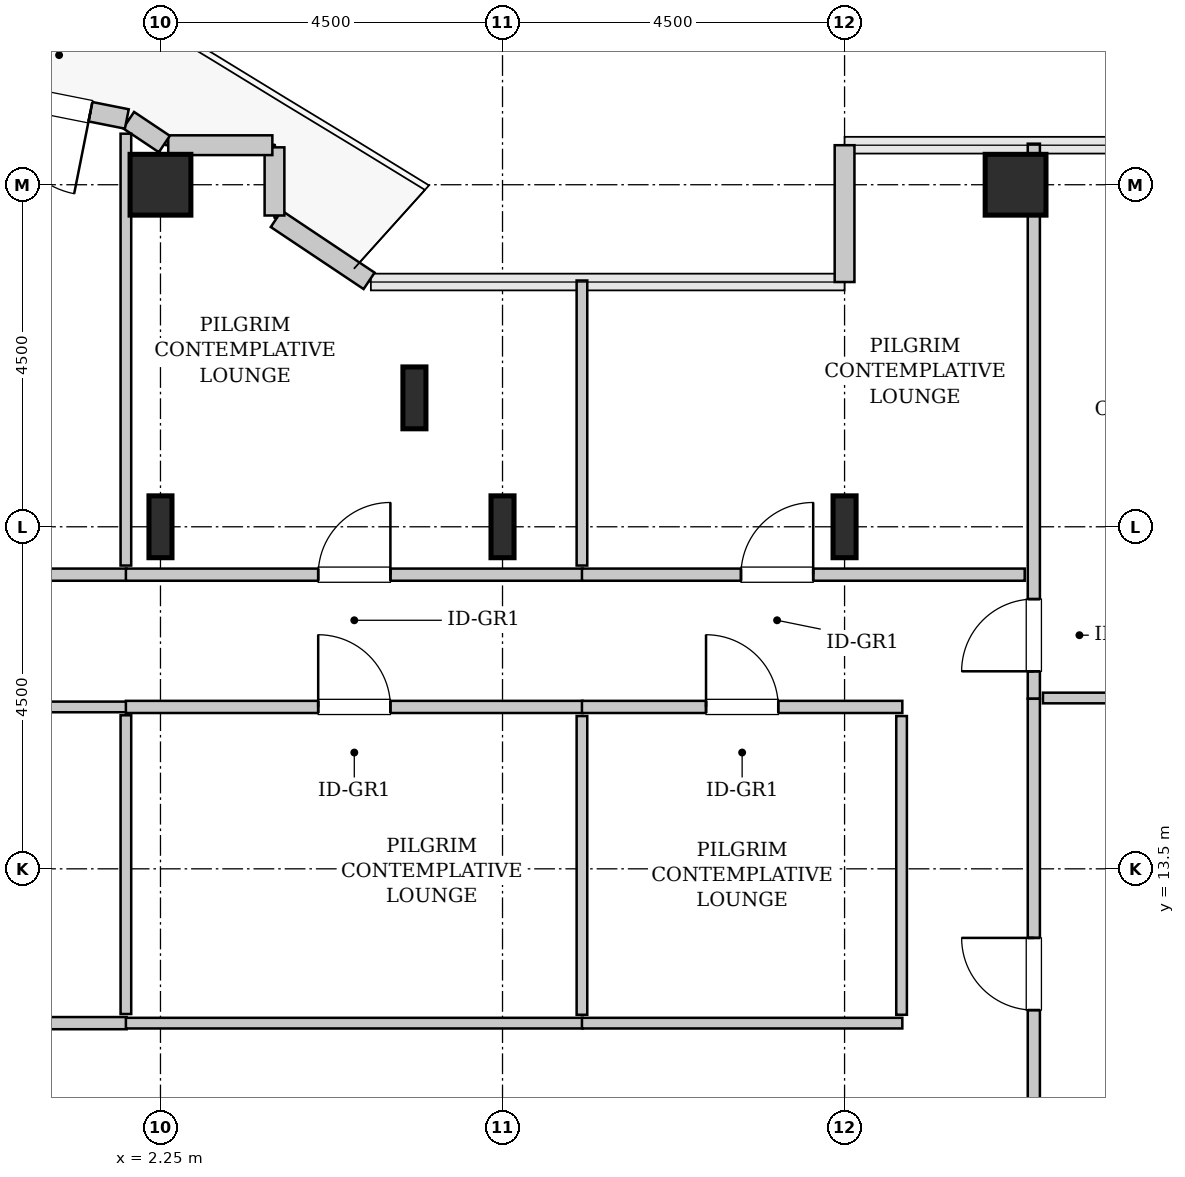
"""IFC4 building model, lengths in metres.
Left out: names, types, materials, properties, quantities, classifications, styles, units other than length and angle.
Written with IfcOpenShell. Run it as: python <this file> out.ifc"""

import sys

from ifc_helpers import new_model, si_unit, direction, frame, frame_2d, origin, origin_2d, place, context, subcontext, project, spatial, rectangle, hollow_rectangle, i_section, extrude, source, transform, mapped, element, fill, save


model = new_model("IFC4")
c1 = context("Model", 3, precision=1e-05, world=origin(), true_north=direction((0.0, 1.0)))
c2 = subcontext(c1, "Body", "Model", "MODEL_VIEW")
j1 = project(units=[si_unit("LENGTHUNIT", "METRE"), si_unit("PLANEANGLEUNIT", "RADIAN")], contexts=[c1])
p1 = place(None, origin())
s1 = spatial("IfcSite", under=j1, at=p1, CompositionType="ELEMENT")
p2 = place(p1, origin())
s2 = spatial("IfcBuilding", under=s1, at=p2, CompositionType="ELEMENT")
p3 = place(p2, frame((0.0, 0.0, 179.2)))
s3 = spatial("IfcBuildingStorey", under=s2, at=p3, CompositionType="ELEMENT", Elevation=179.2)
m1 = source(origin(), c2, "Body", "SweptSolid", [
    extrude(i_section(OverallWidth=0.303, OverallDepth=0.814, WebThickness=0.021, FlangeThickness=0.04, FilletRadius=0.03, at=origin_2d()), origin(), (0.0, 0.0, 1.0), 3.8),
])
p4 = place(p3, frame((2.25, 18.0, 0.0), z_axis=(0.0, 0.0, 1.0), x_axis=(1.0, 0.0, 0.0)))
e1 = element("IfcColumn", 1, at=p4, inside=s3, PredefinedType="COLUMN", context=c2, shape_type="MappedRepresentation", body=[
    mapped(m1, transform((0.0, 0.0, 0.0), x_axis=(1.0, 0.0, 0.0), y_axis=(0.0, 1.0, 0.0), z_axis=(0.0, 0.0, 1.0), scale=1.0)),
])
m2 = source(origin(), c2, "Body", "SweptSolid", [
    extrude(hollow_rectangle(XDim=0.8, YDim=0.8, WallThickness=0.04, InnerFilletRadius=0.04, OuterFilletRadius=0.08, at=origin_2d()), origin(), (0.0, 0.0, 1.0), 3.8),
])
p5 = place(p3, frame((2.25, 22.5, 0.0), z_axis=(0.0, 0.0, 1.0), x_axis=(1.0, 0.0, 0.0)))
e2 = element("IfcColumn", 2, at=p5, inside=s3, PredefinedType="COLUMN", context=c2, shape_type="MappedRepresentation", body=[
    mapped(m2, transform((0.0, 0.0, 0.0), x_axis=(1.0, 0.0, 0.0), y_axis=(0.0, 1.0, 0.0), z_axis=(0.0, 0.0, 1.0), scale=1.0)),
])
for number, where, z_axis, x_axis in (
    (3, (5.591, 19.696, 0.0), (0.0, 0.0, 1.0), (1.0, 0.0, 0.0)),
    (4, (6.75, 18.0, 0.0), (0.0, 0.0, 1.0), (1.0, 0.0, 0.0)),
    (5, (11.25, 18.0, 0.0), (0.0, 0.0, 1.0), (1.0, 0.0, 0.0)),
):
    element("IfcColumn", number, at=place(p3, frame(where, z_axis=z_axis, x_axis=x_axis)), inside=s3, PredefinedType="COLUMN", context=c2, shape_type="MappedRepresentation", body=[
        mapped(m1, transform((0.0, 0.0, 0.0), x_axis=(1.0, 0.0, 0.0), y_axis=(0.0, 1.0, 0.0), z_axis=(0.0, 0.0, 1.0), scale=1.0)),
    ])
p6 = place(p3, frame((13.5, 22.5, 0.0), z_axis=(0.0, 0.0, 1.0), x_axis=(1.0, 0.0, 0.0)))
e6 = element("IfcColumn", 6, at=p6, inside=s3, PredefinedType="COLUMN", context=c2, shape_type="MappedRepresentation", body=[
    mapped(m2, transform((0.0, 0.0, 0.0), x_axis=(1.0, 0.0, 0.0), y_axis=(0.0, 1.0, 0.0), z_axis=(0.0, 0.0, 1.0), scale=1.0)),
])
m3 = source(origin(), c2, "Body", "SweptSolid", [
    extrude(rectangle(XDim=1.8, YDim=0.26, at=frame_2d((0.9, 0.0))), origin(), (0.0, 0.0, 1.0), 3.55),
])
p7 = place(p3, frame((11.25, 23.02, 0.0), z_axis=(0.0, 0.0, 1.0), x_axis=(0.0, -1.0, 0.0)))
e7 = element("IfcWall", 7, at=p7, inside=s3, PredefinedType="SOLIDWALL", context=c2, shape_type="MappedRepresentation", body=[
    mapped(m3, transform((0.0, 0.0, 0.0), x_axis=(1.0, 0.0, 0.0), y_axis=(0.0, 1.0, 0.0), z_axis=(0.0, 0.0, 1.0), scale=1.0)),
])
m4 = source(origin(), c2, "Body", "SweptSolid", [
    extrude(rectangle(XDim=1.469, YDim=0.26, at=frame_2d((0.734, 0.0))), origin(), (0.0, 0.0, 1.0), 3.55),
])
p8 = place(p3, frame((4.995, 21.236, 0.0), z_axis=(0.0, 0.0, 1.0), x_axis=(-0.831461760506, 0.555581983884, 0.0)))
e8 = element("IfcWall", 8, at=p8, inside=s3, PredefinedType="SOLIDWALL", context=c2, shape_type="MappedRepresentation", body=[
    mapped(m4, transform((0.0, 0.0, 0.0), x_axis=(1.0, 0.0, 0.0), y_axis=(0.0, 1.0, 0.0), z_axis=(0.0, 0.0, 1.0), scale=1.0)),
])
m5 = source(origin(), c2, "Body", "SweptSolid", [
    extrude(rectangle(XDim=0.897, YDim=0.26, at=frame_2d((0.448, 0.0))), origin(), (0.0, 0.0, 1.0), 3.55),
])
p9 = place(p3, frame((3.75, 22.095, 0.0), z_axis=(0.0, 0.0, 1.0), x_axis=(0.0, 1.0, 0.0)))
e9 = element("IfcWall", 9, at=p9, inside=s3, PredefinedType="SOLIDWALL", context=c2, shape_type="MappedRepresentation", body=[
    mapped(m5, transform((0.0, 0.0, 0.0), x_axis=(1.0, 0.0, 0.0), y_axis=(0.0, 1.0, 0.0), z_axis=(0.0, 0.0, 1.0), scale=1.0)),
])
m6 = source(origin(), c2, "Body", "SweptSolid", [
    extrude(rectangle(XDim=1.37, YDim=0.26, at=frame_2d((0.685, 0.0))), origin(), (0.0, 0.0, 1.0), 3.55),
])
p10 = place(p3, frame((3.722, 23.02, 0.0), z_axis=(0.0, 0.0, 1.0), x_axis=(-1.0, 0.0, 0.0)))
e10 = element("IfcWall", 10, at=p10, inside=s3, PredefinedType="SOLIDWALL", context=c2, shape_type="MappedRepresentation", body=[
    mapped(m6, transform((0.0, 0.0, 0.0), x_axis=(1.0, 0.0, 0.0), y_axis=(0.0, 1.0, 0.0), z_axis=(0.0, 0.0, 1.0), scale=1.0)),
])
m7 = source(origin(), c2, "Body", "SweptSolid", [
    extrude(rectangle(XDim=0.565, YDim=0.26, at=frame_2d((0.283, 0.0))), origin(), (0.0, 0.0, 1.0), 3.55),
])
p11 = place(p3, frame((2.301, 23.036, 0.0), z_axis=(0.0, 0.0, 1.0), x_axis=(-0.831651492666, 0.555297933317, 0.0)))
e11 = element("IfcWall", 11, at=p11, inside=s3, PredefinedType="SOLIDWALL", context=c2, shape_type="MappedRepresentation", body=[
    mapped(m7, transform((0.0, 0.0, 0.0), x_axis=(1.0, 0.0, 0.0), y_axis=(0.0, 1.0, 0.0), z_axis=(0.0, 0.0, 1.0), scale=1.0)),
])
m8 = source(origin(), c2, "Body", "SweptSolid", [
    extrude(rectangle(XDim=4.137, YDim=0.26, at=frame_2d((2.068, 0.0))), origin(), (0.0, 0.0, 1.0), 3.55),
])
p12 = place(p3, frame((1.807, 23.365, 0.0), z_axis=(0.0, 0.0, 1.0), x_axis=(-0.980782170794, 0.195105954428, 0.0)))
e12 = element("IfcWall", 12, at=p12, inside=s3, PredefinedType="SOLIDWALL", context=c2, shape_type="MappedRepresentation", body=[
    mapped(m8, transform((0.0, 0.0, 0.0), x_axis=(1.0, 0.0, 0.0), y_axis=(0.0, 1.0, 0.0), z_axis=(0.0, 0.0, 1.0), scale=1.0)),
])
p13 = place(p12, frame((0.488, 0.0, 0.0)))
e13 = element("IfcOpeningElement", 13, at=p13, cuts=e12, PredefinedType="OPENING", context=c2, shape_type="SweptSolid", body=[
    extrude(rectangle(XDim=1.1, YDim=2.2, at=frame_2d((0.55, 1.1))), frame((0.0, 0.14, 0.0), z_axis=(0.0, -1.0, 0.0), x_axis=(1.0, 0.0, 0.0)), (0.0, 0.0, 1.0), 0.28),
])
m9 = source(origin(), c2, "Body", "SweptSolid", [
    extrude(rectangle(XDim=7.302, YDim=0.16, at=frame_2d((3.651, 0.0))), origin(), (0.0, 0.0, 1.0), 3.535),
])
p14 = place(p3, frame((13.74, 15.738, 0.0), z_axis=(0.0, 0.0, 1.0), x_axis=(0.0, 1.0, 0.0)))
e14 = element("IfcWall", 14, at=p14, inside=s3, PredefinedType="PARTITIONING", context=c2, shape_type="MappedRepresentation", body=[
    mapped(m9, transform((0.0, 0.0, 0.0), x_axis=(1.0, 0.0, 0.0), y_axis=(0.0, 1.0, 0.0), z_axis=(0.0, 0.0, 1.0), scale=1.0)),
])
p15 = place(p14, frame((0.361, 0.0, 0.0)))
e15 = element("IfcOpeningElement", 15, at=p15, cuts=e14, PredefinedType="OPENING", context=c2, shape_type="SweptSolid", body=[
    extrude(rectangle(XDim=0.95, YDim=2.1, at=frame_2d((0.475, 1.05))), frame((0.0, 0.09, 0.0), z_axis=(0.0, -1.0, 0.0), x_axis=(1.0, 0.0, 0.0)), (0.0, 0.0, 1.0), 0.18),
])
m10 = source(origin(), c2, "Body", "SweptSolid", [
    extrude(rectangle(XDim=11.43, YDim=0.14, at=frame_2d((5.715, 0.0))), origin(), (0.0, 0.0, 1.0), 3.535),
])
p16 = place(p3, frame((13.86, 15.748, 0.0), z_axis=(0.0, 0.0, 1.0), x_axis=(1.0, 0.0, 0.0)))
e16 = element("IfcWall", 16, at=p16, inside=s3, PredefinedType="PARTITIONING", context=c2, shape_type="MappedRepresentation", body=[
    mapped(m10, transform((0.0, 0.0, 0.0), x_axis=(1.0, 0.0, 0.0), y_axis=(0.0, 1.0, 0.0), z_axis=(0.0, 0.0, 1.0), scale=1.0)),
])
m11 = source(origin(), c2, "Body", "SweptSolid", [
    extrude(rectangle(XDim=7.242, YDim=0.16, at=frame_2d((3.621, 0.0))), origin(), (0.0, 0.0, 1.0), 3.535),
])
p17 = place(p3, frame((13.74, 8.495, 0.0), z_axis=(0.0, 0.0, 1.0), x_axis=(0.0, 1.0, 0.0)))
e17 = element("IfcWall", 17, at=p17, inside=s3, PredefinedType="PARTITIONING", context=c2, shape_type="MappedRepresentation", body=[
    mapped(m11, transform((0.0, 0.0, 0.0), x_axis=(1.0, 0.0, 0.0), y_axis=(0.0, 1.0, 0.0), z_axis=(0.0, 0.0, 1.0), scale=1.0)),
])
p18 = place(p17, frame((3.146, 0.0, 0.0)))
e18 = element("IfcOpeningElement", 18, at=p18, cuts=e17, PredefinedType="OPENING", context=c2, shape_type="SweptSolid", body=[
    extrude(rectangle(XDim=0.95, YDim=2.1, at=frame_2d((0.475, 1.05))), frame((0.0, 0.09, 0.0), z_axis=(0.0, -1.0, 0.0), x_axis=(1.0, 0.0, 0.0)), (0.0, 0.0, 1.0), 0.18),
])
m12 = source(origin(), c2, "Body", "SweptSolid", [
    extrude(rectangle(XDim=13.815, YDim=0.16, at=frame_2d((6.907, 0.0))), origin(), (0.0, 0.0, 1.0), 3.535),
])
p19 = place(p3, frame((-12.01, 11.47, 0.0), z_axis=(0.0, 0.0, 1.0), x_axis=(1.0, 0.0, 0.0)))
e19 = element("IfcWall", 19, at=p19, inside=s3, PredefinedType="PARTITIONING", context=c2, shape_type="MappedRepresentation", body=[
    mapped(m12, transform((0.0, 0.0, 0.0), x_axis=(1.0, 0.0, 0.0), y_axis=(0.0, 1.0, 0.0), z_axis=(0.0, 0.0, 1.0), scale=1.0)),
])
p20 = place(p19, frame((6.433, 0.0, 0.0)))
e20 = element("IfcOpeningElement", 20, at=p20, cuts=e19, PredefinedType="OPENING", context=c2, shape_type="SweptSolid", body=[
    extrude(rectangle(XDim=0.95, YDim=2.1, at=frame_2d((0.475, 1.05))), frame((0.0, 0.09, 0.0), z_axis=(0.0, -1.0, 0.0), x_axis=(1.0, 0.0, 0.0)), (0.0, 0.0, 1.0), 0.18),
])
m13 = source(origin(), c2, "Body", "SweptSolid", [
    extrude(rectangle(XDim=13.815, YDim=0.14, at=frame_2d((6.907, 0.0))), origin(), (0.0, 0.0, 1.0), 3.535),
])
p21 = place(p3, frame((-12.01, 15.63, 0.0), z_axis=(0.0, 0.0, 1.0), x_axis=(1.0, 0.0, 0.0)))
e21 = element("IfcWall", 21, at=p21, inside=s3, PredefinedType="PARTITIONING", context=c2, shape_type="MappedRepresentation", body=[
    mapped(m13, transform((0.0, 0.0, 0.0), x_axis=(1.0, 0.0, 0.0), y_axis=(0.0, 1.0, 0.0), z_axis=(0.0, 0.0, 1.0), scale=1.0)),
])
m14 = source(origin(), c2, "Body", "SweptSolid", [
    extrude(rectangle(XDim=3.93, YDim=0.14, at=frame_2d((1.965, 0.0))), origin(), (0.0, 0.0, 1.0), 3.535),
])
p22 = place(p3, frame((1.795, 11.59, 0.0), z_axis=(0.0, 0.0, 1.0), x_axis=(0.0, 1.0, 0.0)))
e22 = element("IfcWall", 22, at=p22, inside=s3, PredefinedType="PARTITIONING", context=c2, shape_type="MappedRepresentation", body=[
    mapped(m14, transform((0.0, 0.0, 0.0), x_axis=(1.0, 0.0, 0.0), y_axis=(0.0, 1.0, 0.0), z_axis=(0.0, 0.0, 1.0), scale=1.0)),
])
m15 = source(origin(), c2, "Body", "SweptSolid", [
    extrude(rectangle(XDim=9.245, YDim=0.16, at=frame_2d((4.623, 0.0))), origin(), (0.0, 0.0, 1.0), 3.535),
])
p23 = place(p3, frame((-7.44, 17.37, 0.0), z_axis=(0.0, 0.0, 1.0), x_axis=(1.0, 0.0, 0.0)))
e23 = element("IfcWall", 23, at=p23, inside=s3, PredefinedType="PARTITIONING", context=c2, shape_type="MappedRepresentation", body=[
    mapped(m15, transform((0.0, 0.0, 0.0), x_axis=(1.0, 0.0, 0.0), y_axis=(0.0, 1.0, 0.0), z_axis=(0.0, 0.0, 1.0), scale=1.0)),
])
p24 = place(p23, frame((3.529, 0.0, 0.0)))
e24 = element("IfcOpeningElement", 24, at=p24, cuts=e23, PredefinedType="OPENING", context=c2, shape_type="SweptSolid", body=[
    extrude(rectangle(XDim=0.95, YDim=2.1, at=frame_2d((0.475, 1.05))), frame((0.0, 0.09, 0.0), z_axis=(0.0, -1.0, 0.0), x_axis=(1.0, 0.0, 0.0)), (0.0, 0.0, 1.0), 0.18),
])
m16 = source(origin(), c2, "Body", "SweptSolid", [
    extrude(rectangle(XDim=5.681, YDim=0.14, at=frame_2d((2.841, 0.0))), origin(), (0.0, 0.0, 1.0), 2.875),
])
p25 = place(p3, frame((1.795, 17.49, 0.0), z_axis=(0.0, 0.0, 1.0), x_axis=(0.0, 1.0, 0.0)))
e25 = element("IfcWall", 25, at=p25, inside=s3, PredefinedType="PARTITIONING", context=c2, shape_type="MappedRepresentation", body=[
    mapped(m16, transform((0.0, 0.0, 0.0), x_axis=(1.0, 0.0, 0.0), y_axis=(0.0, 1.0, 0.0), z_axis=(0.0, 0.0, 1.0), scale=1.0)),
])
m17 = source(origin(), c2, "Body", "SweptSolid", [
    extrude(rectangle(XDim=6.01, YDim=0.16, at=frame_2d((3.005, 0.0))), origin(), (0.0, 0.0, 1.0), 3.535),
])
p26 = place(p3, frame((1.795, 17.37, 0.0), z_axis=(0.0, 0.0, 1.0), x_axis=(1.0, 0.0, 0.0)))
e26 = element("IfcWall", 26, at=p26, inside=s3, PredefinedType="PARTITIONING", context=c2, shape_type="MappedRepresentation", body=[
    mapped(m17, transform((0.0, 0.0, 0.0), x_axis=(1.0, 0.0, 0.0), y_axis=(0.0, 1.0, 0.0), z_axis=(0.0, 0.0, 1.0), scale=1.0)),
])
p27 = place(p26, frame((2.53, 0.0, 0.0)))
e27 = element("IfcOpeningElement", 27, at=p27, cuts=e26, PredefinedType="OPENING", context=c2, shape_type="SweptSolid", body=[
    extrude(rectangle(XDim=0.95, YDim=2.1, at=frame_2d((0.475, 1.05))), frame((0.0, 0.09, 0.0), z_axis=(0.0, -1.0, 0.0), x_axis=(1.0, 0.0, 0.0)), (0.0, 0.0, 1.0), 0.18),
])
m18 = source(origin(), c2, "Body", "SweptSolid", [
    extrude(rectangle(XDim=3.75, YDim=0.14, at=frame_2d((1.875, 0.0))), origin(), (0.0, 0.0, 1.0), 3.535),
])
p28 = place(p3, frame((7.795, 17.49, 0.0), z_axis=(0.0, 0.0, 1.0), x_axis=(0.0, 1.0, 0.0)))
e28 = element("IfcWall", 28, at=p28, inside=s3, PredefinedType="PARTITIONING", context=c2, shape_type="MappedRepresentation", body=[
    mapped(m18, transform((0.0, 0.0, 0.0), x_axis=(1.0, 0.0, 0.0), y_axis=(0.0, 1.0, 0.0), z_axis=(0.0, 0.0, 1.0), scale=1.0)),
])
p29 = place(p3, frame((1.795, 15.63, 0.0), z_axis=(0.0, 0.0, 1.0), x_axis=(1.0, 0.0, 0.0)))
e29 = element("IfcWall", 29, at=p29, inside=s3, PredefinedType="PARTITIONING", context=c2, shape_type="MappedRepresentation", body=[
    mapped(m17, transform((0.0, 0.0, 0.0), x_axis=(1.0, 0.0, 0.0), y_axis=(0.0, 1.0, 0.0), z_axis=(0.0, 0.0, 1.0), scale=1.0)),
])
p30 = place(p29, frame((2.53, 0.0, 0.0)))
e30 = element("IfcOpeningElement", 30, at=p30, cuts=e29, PredefinedType="OPENING", context=c2, shape_type="SweptSolid", body=[
    extrude(rectangle(XDim=0.95, YDim=2.1, at=frame_2d((0.475, 1.05))), frame((0.0, 0.09, 0.0), z_axis=(0.0, -1.0, 0.0), x_axis=(1.0, 0.0, 0.0)), (0.0, 0.0, 1.0), 0.18),
])
m19 = source(origin(), c2, "Body", "SweptSolid", [
    extrude(rectangle(XDim=6.01, YDim=0.14, at=frame_2d((3.005, 0.0))), origin(), (0.0, 0.0, 1.0), 3.535),
])
p31 = place(p3, frame((1.795, 11.47, 0.0), z_axis=(0.0, 0.0, 1.0), x_axis=(1.0, 0.0, 0.0)))
e31 = element("IfcWall", 31, at=p31, inside=s3, PredefinedType="PARTITIONING", context=c2, shape_type="MappedRepresentation", body=[
    mapped(m19, transform((0.0, 0.0, 0.0), x_axis=(1.0, 0.0, 0.0), y_axis=(0.0, 1.0, 0.0), z_axis=(0.0, 0.0, 1.0), scale=1.0)),
])
p32 = place(p3, frame((7.795, 11.58, 0.0), z_axis=(0.0, 0.0, 1.0), x_axis=(0.0, 1.0, 0.0)))
e32 = element("IfcWall", 32, at=p32, inside=s3, PredefinedType="PARTITIONING", context=c2, shape_type="MappedRepresentation", body=[
    mapped(m14, transform((0.0, 0.0, 0.0), x_axis=(1.0, 0.0, 0.0), y_axis=(0.0, 1.0, 0.0), z_axis=(0.0, 0.0, 1.0), scale=1.0)),
])
m20 = source(origin(), c2, "Body", "SweptSolid", [
    extrude(rectangle(XDim=5.825, YDim=0.16, at=frame_2d((2.913, 0.0))), origin(), (0.0, 0.0, 1.0), 3.535),
])
p33 = place(p3, frame((7.795, 17.37, 0.0), z_axis=(0.0, 0.0, 1.0), x_axis=(1.0, 0.0, 0.0)))
e33 = element("IfcWall", 33, at=p33, inside=s3, PredefinedType="PARTITIONING", context=c2, shape_type="MappedRepresentation", body=[
    mapped(m20, transform((0.0, 0.0, 0.0), x_axis=(1.0, 0.0, 0.0), y_axis=(0.0, 1.0, 0.0), z_axis=(0.0, 0.0, 1.0), scale=1.0)),
])
p34 = place(p33, frame((2.092, 0.0, 0.0)))
e34 = element("IfcOpeningElement", 34, at=p34, cuts=e33, PredefinedType="OPENING", context=c2, shape_type="SweptSolid", body=[
    extrude(rectangle(XDim=0.95, YDim=2.1, at=frame_2d((0.475, 1.05))), frame((0.0, 0.09, 0.0), z_axis=(0.0, -1.0, 0.0), x_axis=(1.0, 0.0, 0.0)), (0.0, 0.0, 1.0), 0.18),
])
m21 = source(origin(), c2, "Body", "SweptSolid", [
    extrude(rectangle(XDim=4.215, YDim=0.16, at=frame_2d((2.107, 0.0))), origin(), (0.0, 0.0, 1.0), 3.535),
])
p35 = place(p3, frame((7.795, 15.63, 0.0), z_axis=(0.0, 0.0, 1.0), x_axis=(1.0, 0.0, 0.0)))
e35 = element("IfcWall", 35, at=p35, inside=s3, PredefinedType="PARTITIONING", context=c2, shape_type="MappedRepresentation", body=[
    mapped(m21, transform((0.0, 0.0, 0.0), x_axis=(1.0, 0.0, 0.0), y_axis=(0.0, 1.0, 0.0), z_axis=(0.0, 0.0, 1.0), scale=1.0)),
])
p36 = place(p35, frame((1.633, 0.0, 0.0)))
e36 = element("IfcOpeningElement", 36, at=p36, cuts=e35, PredefinedType="OPENING", context=c2, shape_type="SweptSolid", body=[
    extrude(rectangle(XDim=0.95, YDim=2.1, at=frame_2d((0.475, 1.05))), frame((0.0, 0.09, 0.0), z_axis=(0.0, -1.0, 0.0), x_axis=(1.0, 0.0, 0.0)), (0.0, 0.0, 1.0), 0.18),
])
m22 = source(origin(), c2, "Body", "SweptSolid", [
    extrude(rectangle(XDim=4.215, YDim=0.14, at=frame_2d((2.107, 0.0))), origin(), (0.0, 0.0, 1.0), 3.535),
])
p37 = place(p3, frame((7.795, 11.47, 0.0), z_axis=(0.0, 0.0, 1.0), x_axis=(1.0, 0.0, 0.0)))
e37 = element("IfcWall", 37, at=p37, inside=s3, PredefinedType="PARTITIONING", context=c2, shape_type="MappedRepresentation", body=[
    mapped(m22, transform((0.0, 0.0, 0.0), x_axis=(1.0, 0.0, 0.0), y_axis=(0.0, 1.0, 0.0), z_axis=(0.0, 0.0, 1.0), scale=1.0)),
])
p38 = place(p3, frame((12.0, 11.58, 0.0), z_axis=(0.0, 0.0, 1.0), x_axis=(0.0, 1.0, 0.0)))
e38 = element("IfcWall", 38, at=p38, inside=s3, PredefinedType="PARTITIONING", context=c2, shape_type="MappedRepresentation", body=[
    mapped(m14, transform((0.0, 0.0, 0.0), x_axis=(1.0, 0.0, 0.0), y_axis=(0.0, 1.0, 0.0), z_axis=(0.0, 0.0, 1.0), scale=1.0)),
])
m23 = source(origin(), c2, "Body", "SweptSolid", [
    extrude(rectangle(XDim=1.1, YDim=2.2, at=frame_2d((0.55, 1.1))), frame((0.0, 0.025, 0.0), z_axis=(0.0, -1.0, 0.0), x_axis=(1.0, 0.0, 0.0)), (0.0, 0.0, 1.0), 0.05),
])
p39 = place(p13, origin())
e39 = element("IfcDoor", 39, at=p39, inside=s3, OperationType="SINGLE_SWING_LEFT", PredefinedType="DOOR", context=c2, shape_type="MappedRepresentation", body=[
    mapped(m23, transform((0.0, 0.0, 0.0), x_axis=(1.0, 0.0, 0.0), y_axis=(0.0, 1.0, 0.0), z_axis=(0.0, 0.0, 1.0), scale=1.0)),
])
fill(e13, e39)
m24 = source(origin(), c2, "Body", "SweptSolid", [
    extrude(rectangle(XDim=0.95, YDim=2.1, at=frame_2d((0.475, 1.05))), frame((0.0, 0.025, 0.0), z_axis=(0.0, -1.0, 0.0), x_axis=(1.0, 0.0, 0.0)), (0.0, 0.0, 1.0), 0.05),
])
p40 = place(p15, origin())
e40 = element("IfcDoor", 40, at=p40, inside=s3, OperationType="SINGLE_SWING_LEFT", PredefinedType="DOOR", context=c2, shape_type="MappedRepresentation", body=[
    mapped(m24, transform((0.0, 0.0, 0.0), x_axis=(1.0, 0.0, 0.0), y_axis=(0.0, 1.0, 0.0), z_axis=(0.0, 0.0, 1.0), scale=1.0)),
])
fill(e15, e40)
p41 = place(p18, origin())
e41 = element("IfcDoor", 41, at=p41, inside=s3, OperationType="SINGLE_SWING_RIGHT", PredefinedType="DOOR", context=c2, shape_type="MappedRepresentation", body=[
    mapped(m24, transform((0.0, 0.0, 0.0), x_axis=(1.0, 0.0, 0.0), y_axis=(0.0, 1.0, 0.0), z_axis=(0.0, 0.0, 1.0), scale=1.0)),
])
fill(e18, e41)
p42 = place(p27, origin())
e42 = element("IfcDoor", 42, at=p42, inside=s3, OperationType="SINGLE_SWING_RIGHT", PredefinedType="DOOR", context=c2, shape_type="MappedRepresentation", body=[
    mapped(m24, transform((0.0, 0.0, 0.0), x_axis=(1.0, 0.0, 0.0), y_axis=(0.0, 1.0, 0.0), z_axis=(0.0, 0.0, 1.0), scale=1.0)),
])
fill(e27, e42)
p43 = place(p30, origin())
e43 = element("IfcDoor", 43, at=p43, inside=s3, OperationType="SINGLE_SWING_LEFT", PredefinedType="DOOR", context=c2, shape_type="MappedRepresentation", body=[
    mapped(m24, transform((0.0, 0.0, 0.0), x_axis=(1.0, 0.0, 0.0), y_axis=(0.0, 1.0, 0.0), z_axis=(0.0, 0.0, 1.0), scale=1.0)),
])
fill(e30, e43)
p44 = place(p34, origin())
e44 = element("IfcDoor", 44, at=p44, inside=s3, OperationType="SINGLE_SWING_RIGHT", PredefinedType="DOOR", context=c2, shape_type="MappedRepresentation", body=[
    mapped(m24, transform((0.0, 0.0, 0.0), x_axis=(1.0, 0.0, 0.0), y_axis=(0.0, 1.0, 0.0), z_axis=(0.0, 0.0, 1.0), scale=1.0)),
])
fill(e34, e44)
p45 = place(p36, origin())
e45 = element("IfcDoor", 45, at=p45, inside=s3, OperationType="SINGLE_SWING_LEFT", PredefinedType="DOOR", context=c2, shape_type="MappedRepresentation", body=[
    mapped(m24, transform((0.0, 0.0, 0.0), x_axis=(1.0, 0.0, 0.0), y_axis=(0.0, 1.0, 0.0), z_axis=(0.0, 0.0, 1.0), scale=1.0)),
])
fill(e36, e45)
save(model, sys.argv[1])
